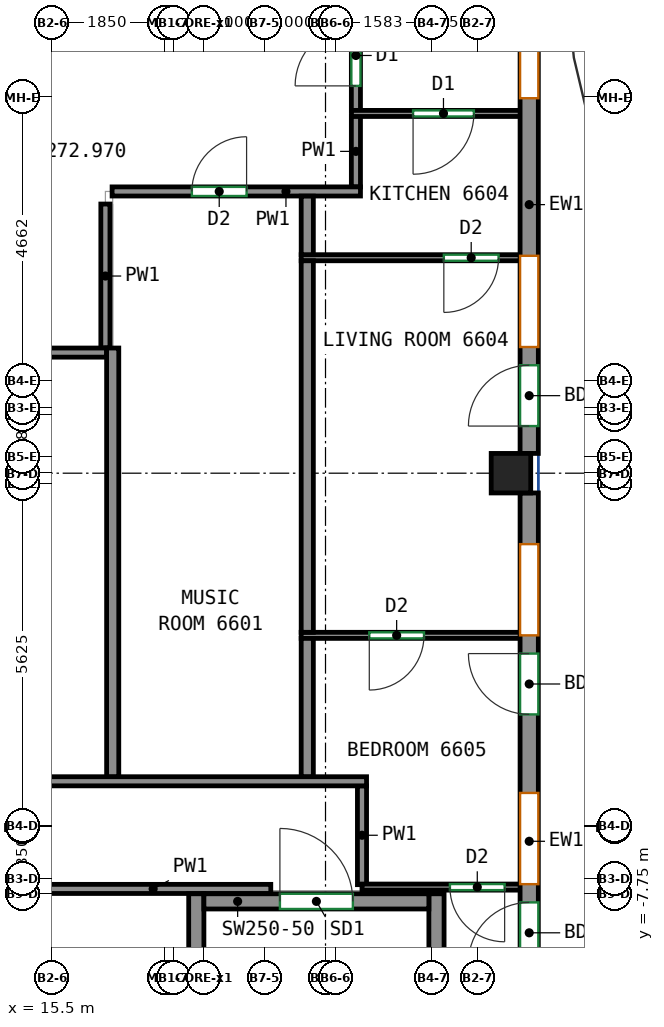
"""IFC4 building model, lengths in metres.
Left out: names, types, materials, properties, quantities, classifications, styles, units other than length and angle.
Written with IfcOpenShell. Run it as: python <this file> out.ifc"""

import sys

from ifc_helpers import new_model, si_unit, direction, frame, frame_2d, origin, origin_2d, place, context, subcontext, project, spatial, rectangle, extrude, source, transform, mapped, element, fill, save


model = new_model("IFC4")
c1 = context("Model", 3, precision=1e-05, world=origin(), true_north=direction((0.0, 1.0)))
c2 = subcontext(c1, "Body", "Model", "MODEL_VIEW")
j1 = project(units=[si_unit("LENGTHUNIT", "METRE"), si_unit("PLANEANGLEUNIT", "RADIAN")], contexts=[c1])
p1 = place(None, origin())
s1 = spatial("IfcSite", under=j1, at=p1, CompositionType="ELEMENT")
p2 = place(p1, origin())
s2 = spatial("IfcBuilding", under=s1, at=p2, CompositionType="ELEMENT")
p3 = place(p2, frame((0.0, 0.0, 270.4)))
s3 = spatial("IfcBuildingStorey", under=s2, at=p3, CompositionType="ELEMENT", Elevation=270.4)
m1 = source(origin(), c2, "Body", "SweptSolid", [
    extrude(rectangle(XDim=0.65, YDim=0.65, at=origin_2d()), origin(), (0.0, 0.0, 1.0), 3.12),
])
p4 = place(p3, frame((23.05, -0.833, 0.0), z_axis=(0.0, 0.0, 1.0), x_axis=(1.0, 0.0, 0.0)))
e1 = element("IfcColumn", 1, at=p4, inside=s3, PredefinedType="COLUMN", context=c2, shape_type="MappedRepresentation", body=[
    mapped(m1, transform((0.0, 0.0, 0.0))),
])
m2 = source(origin(), c2, "Body", "SweptSolid", [
    extrude(rectangle(XDim=8.0, YDim=0.25, at=frame_2d((4.0, 0.0))), origin(), (0.0, 0.0, 1.0), 3.12),
])
for number, where, z_axis, x_axis in (
    (2, (17.875, -15.75, 0.0), (0.0, 0.0, 1.0), (0.0, 1.0, 0.0)),
    (3, (21.825, -15.75, 0.0), (0.0, 0.0, 1.0), (0.0, 1.0, 0.0)),
):
    element("IfcWall", number, at=place(p3, frame(where, z_axis=z_axis, x_axis=x_axis)), inside=s3, PredefinedType="SHEAR", context=c2, shape_type="MappedRepresentation", body=[
        mapped(m2, transform((0.0, 0.0, 0.0))),
    ])
m3 = source(origin(), c2, "Body", "SweptSolid", [
    extrude(rectangle(XDim=3.7, YDim=0.25, at=frame_2d((1.85, 0.0))), origin(), (0.0, 0.0, 1.0), 3.12),
])
p5 = place(p3, frame((18.0, -7.875, 0.0), z_axis=(0.0, 0.0, 1.0), x_axis=(1.0, 0.0, 0.0)))
e4 = element("IfcWall", 4, at=p5, inside=s3, PredefinedType="SHEAR", context=c2, shape_type="MappedRepresentation", body=[
    mapped(m3, transform((0.0, 0.0, 0.0))),
])
p6 = place(p5, frame((1.25, 0.0, 0.0)))
e5 = element("IfcOpeningElement", 5, at=p6, cuts=e4, PredefinedType="OPENING", context=c2, shape_type="SweptSolid", body=[
    extrude(rectangle(XDim=1.2, YDim=2.1, at=frame_2d((0.6, 1.05))), frame((0.0, 0.135, 0.0), z_axis=(0.0, -1.0, 0.0), x_axis=(1.0, 0.0, 0.0)), (0.0, 0.0, 1.0), 0.27),
])
m4 = source(origin(), c2, "Body", "SweptSolid", [
    extrude(rectangle(XDim=8.184, YDim=0.3, at=frame_2d((4.092, 0.0))), origin(), (0.0, 0.0, 1.0), 3.12),
])
p7 = place(p3, frame((23.35, -9.342, 0.0), z_axis=(0.0, 0.0, 1.0), x_axis=(0.0, 1.0, 0.0)))
e6 = element("IfcWall", 6, at=p7, inside=s3, PredefinedType="SOLIDWALL", context=c2, shape_type="MappedRepresentation", body=[
    mapped(m4, transform((0.0, 0.0, 0.0))),
])
p8 = place(p7, frame((1.75, 0.0, 0.8)))
e7 = element("IfcOpeningElement", 7, at=p8, cuts=e6, PredefinedType="OPENING", context=c2, shape_type="SweptSolid", body=[
    extrude(rectangle(XDim=1.5, YDim=2.05, at=frame_2d((0.75, 1.025))), frame((0.0, 0.16, 0.0), z_axis=(0.0, -1.0, 0.0), x_axis=(1.0, 0.0, 0.0)), (0.0, 0.0, 1.0), 0.32),
])
p9 = place(p7, frame((0.45, 0.0, 0.0)))
e8 = element("IfcOpeningElement", 8, at=p9, cuts=e6, PredefinedType="OPENING", context=c2, shape_type="SweptSolid", body=[
    extrude(rectangle(XDim=1.0, YDim=2.1, at=frame_2d((0.5, 1.05))), frame((0.0, 0.16, 0.0), z_axis=(0.0, -1.0, 0.0), x_axis=(1.0, 0.0, 0.0)), (0.0, 0.0, 1.0), 0.32),
])
p10 = place(p7, frame((5.842, 0.0, 0.8)))
e9 = element("IfcOpeningElement", 9, at=p10, cuts=e6, PredefinedType="OPENING", context=c2, shape_type="SweptSolid", body=[
    extrude(rectangle(XDim=1.5, YDim=2.05, at=frame_2d((0.75, 1.025))), frame((0.0, 0.16, 0.0), z_axis=(0.0, -1.0, 0.0), x_axis=(1.0, 0.0, 0.0)), (0.0, 0.0, 1.0), 0.32),
])
p11 = place(p7, frame((4.542, 0.0, 0.0)))
e10 = element("IfcOpeningElement", 10, at=p11, cuts=e6, PredefinedType="OPENING", context=c2, shape_type="SweptSolid", body=[
    extrude(rectangle(XDim=1.0, YDim=2.1, at=frame_2d((0.5, 1.05))), frame((0.0, 0.16, 0.0), z_axis=(0.0, -1.0, 0.0), x_axis=(1.0, 0.0, 0.0)), (0.0, 0.0, 1.0), 0.32),
])
m5 = source(origin(), c2, "Body", "SweptSolid", [
    extrude(rectangle(XDim=8.183, YDim=0.3, at=frame_2d((4.092, 0.0))), origin(), (0.0, 0.0, 1.0), 3.12),
])
p12 = place(p3, frame((23.35, -0.508, 0.0), z_axis=(0.0, 0.0, 1.0), x_axis=(0.0, 1.0, 0.0)))
e11 = element("IfcWall", 11, at=p12, inside=s3, PredefinedType="SOLIDWALL", context=c2, shape_type="MappedRepresentation", body=[
    mapped(m5, transform((0.0, 0.0, 0.0))),
])
p13 = place(p12, frame((1.75, 0.0, 0.8)))
e12 = element("IfcOpeningElement", 12, at=p13, cuts=e11, PredefinedType="OPENING", context=c2, shape_type="SweptSolid", body=[
    extrude(rectangle(XDim=1.5, YDim=2.05, at=frame_2d((0.75, 1.025))), frame((0.0, 0.16, 0.0), z_axis=(0.0, -1.0, 0.0), x_axis=(1.0, 0.0, 0.0)), (0.0, 0.0, 1.0), 0.32),
])
p14 = place(p12, frame((0.45, 0.0, 0.0)))
e13 = element("IfcOpeningElement", 13, at=p14, cuts=e11, PredefinedType="OPENING", context=c2, shape_type="SweptSolid", body=[
    extrude(rectangle(XDim=1.0, YDim=2.1, at=frame_2d((0.5, 1.05))), frame((0.0, 0.16, 0.0), z_axis=(0.0, -1.0, 0.0), x_axis=(1.0, 0.0, 0.0)), (0.0, 0.0, 1.0), 0.32),
])
p15 = place(p12, frame((5.842, 0.0, 0.8)))
e14 = element("IfcOpeningElement", 14, at=p15, cuts=e11, PredefinedType="OPENING", context=c2, shape_type="SweptSolid", body=[
    extrude(rectangle(XDim=1.5, YDim=2.05, at=frame_2d((0.75, 1.025))), frame((0.0, 0.16, 0.0), z_axis=(0.0, -1.0, 0.0), x_axis=(1.0, 0.0, 0.0)), (0.0, 0.0, 1.0), 0.32),
])
p16 = place(p3, frame((15.23, -7.67, 0.0), z_axis=(0.0, 0.0, 1.0), x_axis=(1.0, 0.0, 0.0)))
e15 = element("IfcWall", 15, at=p16, inside=s3, PredefinedType="PARTITIONING", context=c2, shape_type="SweptSolid", body=[
    extrude(rectangle(XDim=3.87, YDim=0.15, at=frame_2d((1.935, 0.0))), origin(), (0.0, 0.0, 1.0), 3.12),
])
p17 = place(p3, frame((20.6, -7.6, 0.0), z_axis=(0.0, 0.0, 1.0), x_axis=(0.0, 1.0, 0.0)))
e16 = element("IfcWall", 16, at=p17, inside=s3, PredefinedType="PARTITIONING", context=c2, shape_type="SweptSolid", body=[
    extrude(rectangle(XDim=1.625, YDim=0.15, at=frame_2d((0.812, 0.0))), origin(), (0.0, 0.0, 1.0), 3.12),
])
p18 = place(p3, frame((20.5, 3.875, 0.0), z_axis=(0.0, 0.0, 1.0), x_axis=(0.0, 1.0, 0.0)))
e17 = element("IfcWall", 17, at=p18, inside=s3, PredefinedType="PARTITIONING", context=c2, shape_type="SweptSolid", body=[
    extrude(rectangle(XDim=1.168, YDim=0.15, at=frame_2d((0.584, 0.0))), origin(), (0.0, 0.0, 1.0), 3.12),
])
p19 = place(p3, frame((20.5, 5.123, 0.0), z_axis=(0.0, 0.0, 1.0), x_axis=(0.0, 1.0, 0.0)))
e18 = element("IfcWall", 18, at=p19, inside=s3, PredefinedType="PARTITIONING", context=c2, shape_type="SweptSolid", body=[
    extrude(rectangle(XDim=2.787, YDim=0.15, at=frame_2d((1.394, 0.0))), origin(), (0.0, 0.0, 1.0), 3.12),
])
p20 = place(p19, frame((0.413, 0.0, 0.0)))
e19 = element("IfcOpeningElement", 19, at=p20, cuts=e18, PredefinedType="OPENING", context=c2, shape_type="SweptSolid", body=[
    extrude(rectangle(XDim=1.0, YDim=2.1, at=frame_2d((0.5, 1.05))), frame((0.0, 0.085, 0.0), z_axis=(0.0, -1.0, 0.0), x_axis=(1.0, 0.0, 0.0)), (0.0, 0.0, 1.0), 0.17),
])
p21 = place(p3, frame((16.38, 1.225, 0.0), z_axis=(0.0, 0.0, 1.0), x_axis=(0.0, 1.0, 0.0)))
e20 = element("IfcWall", 20, at=p21, inside=s3, PredefinedType="PARTITIONING", context=c2, shape_type="SweptSolid", body=[
    extrude(rectangle(XDim=2.368, YDim=0.15, at=frame_2d((1.184, 0.0))), origin(), (0.0, 0.0, 1.0), 3.12),
])
p22 = place(p3, frame((8.305, 1.15, 0.0), z_axis=(0.0, 0.0, 1.0), x_axis=(1.0, 0.0, 0.0)))
e21 = element("IfcWall", 21, at=p22, inside=s3, PredefinedType="PARTITIONING", context=c2, shape_type="SweptSolid", body=[
    extrude(rectangle(XDim=8.095, YDim=0.15, at=frame_2d((4.047, 0.0))), origin(), (0.0, 0.0, 1.0), 3.12),
])
p23 = place(p3, frame((8.305, -5.9, 0.0), z_axis=(0.0, 0.0, 1.0), x_axis=(1.0, 0.0, 0.0)))
e22 = element("IfcWall", 22, at=p23, inside=s3, PredefinedType="PARTITIONING", context=c2, shape_type="SweptSolid", body=[
    extrude(rectangle(XDim=12.37, YDim=0.15, at=frame_2d((6.185, 0.0))), origin(), (0.0, 0.0, 1.0), 3.12),
])
p24 = place(p23, frame((6.004, 0.0, 0.0)))
e23 = element("IfcOpeningElement", 23, at=p24, cuts=e22, PredefinedType="OPENING", context=c2, shape_type="SweptSolid", body=[
    extrude(rectangle(XDim=0.9, YDim=2.1, at=frame_2d((0.45, 1.05))), frame((0.0, 0.085, 0.0), z_axis=(0.0, -1.0, 0.0), x_axis=(1.0, 0.0, 0.0)), (0.0, 0.0, 1.0), 0.17),
])
p25 = place(p3, frame((16.49, 3.8, 0.0), z_axis=(0.0, 0.0, 1.0), x_axis=(1.0, 0.0, 0.0)))
e24 = element("IfcWall", 24, at=p25, inside=s3, PredefinedType="PARTITIONING", context=c2, shape_type="SweptSolid", body=[
    extrude(rectangle(XDim=4.085, YDim=0.15, at=frame_2d((2.042, 0.0))), origin(), (0.0, 0.0, 1.0), 3.12),
])
p26 = place(p25, frame((1.312, 0.0, 0.0)))
e25 = element("IfcOpeningElement", 25, at=p26, cuts=e24, PredefinedType="OPENING", context=c2, shape_type="SweptSolid", body=[
    extrude(rectangle(XDim=0.9, YDim=2.1, at=frame_2d((0.45, 1.05))), frame((0.0, 0.085, 0.0), z_axis=(0.0, -1.0, 0.0), x_axis=(1.0, 0.0, 0.0)), (0.0, 0.0, 1.0), 0.17),
])
p27 = place(p3, frame((23.25, -7.64, 0.0), z_axis=(0.0, 0.0, 1.0), x_axis=(-1.0, 0.0, 0.0)))
e26 = element("IfcWall", 26, at=p27, inside=s3, PredefinedType="PARTITIONING", context=c2, shape_type="SweptSolid", body=[
    extrude(rectangle(XDim=2.65, YDim=0.1, at=frame_2d((1.325, 0.0))), origin(), (0.0, 0.0, 1.0), 3.12),
])
p28 = place(p27, frame((0.304, 0.0, 0.0)))
e27 = element("IfcOpeningElement", 27, at=p28, cuts=e26, PredefinedType="OPENING", context=c2, shape_type="SweptSolid", body=[
    extrude(rectangle(XDim=0.9, YDim=2.1, at=frame_2d((0.45, 1.05))), frame((0.0, 0.06, 0.0), z_axis=(0.0, -1.0, 0.0), x_axis=(1.0, 0.0, 0.0)), (0.0, 0.0, 1.0), 0.12),
])
p29 = place(p3, frame((23.25, -3.5, 0.0), z_axis=(0.0, 0.0, 1.0), x_axis=(-1.0, 0.0, 0.0)))
e28 = element("IfcWall", 28, at=p29, inside=s3, PredefinedType="PARTITIONING", context=c2, shape_type="SweptSolid", body=[
    extrude(rectangle(XDim=3.65, YDim=0.1, at=frame_2d((1.825, 0.0))), origin(), (0.0, 0.0, 1.0), 3.12),
])
p30 = place(p29, frame((1.63, 0.0, 0.0)))
e29 = element("IfcOpeningElement", 29, at=p30, cuts=e28, PredefinedType="OPENING", context=c2, shape_type="SweptSolid", body=[
    extrude(rectangle(XDim=0.9, YDim=2.1, at=frame_2d((0.45, 1.05))), frame((0.0, 0.06, 0.0), z_axis=(0.0, -1.0, 0.0), x_axis=(1.0, 0.0, 0.0)), (0.0, 0.0, 1.0), 0.12),
])
p31 = place(p3, frame((19.7, -5.823, 0.0), z_axis=(0.0, 0.0, 1.0), x_axis=(0.0, 1.0, 0.0)))
e30 = element("IfcWall", 30, at=p31, inside=s3, PredefinedType="PARTITIONING", context=c2, shape_type="SweptSolid", body=[
    extrude(rectangle(XDim=2.273, YDim=0.2, at=frame_2d((1.136, 0.0))), origin(), (0.0, 0.0, 1.0), 3.12),
])
p32 = place(p3, frame((23.25, 2.71, 0.0), z_axis=(0.0, 0.0, 1.0), x_axis=(-1.0, 0.0, 0.0)))
e31 = element("IfcWall", 31, at=p32, inside=s3, PredefinedType="PARTITIONING", context=c2, shape_type="SweptSolid", body=[
    extrude(rectangle(XDim=3.65, YDim=0.1, at=frame_2d((1.825, 0.0))), origin(), (0.0, 0.0, 1.0), 3.12),
])
p33 = place(p32, frame((0.404, 0.0, 0.0)))
e32 = element("IfcOpeningElement", 32, at=p33, cuts=e31, PredefinedType="OPENING", context=c2, shape_type="SweptSolid", body=[
    extrude(rectangle(XDim=0.9, YDim=2.1, at=frame_2d((0.45, 1.05))), frame((0.0, 0.06, 0.0), z_axis=(0.0, -1.0, 0.0), x_axis=(1.0, 0.0, 0.0)), (0.0, 0.0, 1.0), 0.12),
])
p34 = place(p3, frame((19.7, -3.45, 0.0), z_axis=(0.0, 0.0, 1.0), x_axis=(0.0, 1.0, 0.0)))
e33 = element("IfcWall", 33, at=p34, inside=s3, PredefinedType="PARTITIONING", context=c2, shape_type="SweptSolid", body=[
    extrude(rectangle(XDim=6.11, YDim=0.2, at=frame_2d((3.055, 0.0))), origin(), (0.0, 0.0, 1.0), 3.12),
])
p35 = place(p3, frame((23.25, 5.083, 0.0), z_axis=(0.0, 0.0, 1.0), x_axis=(-1.0, 0.0, 0.0)))
e34 = element("IfcWall", 34, at=p35, inside=s3, PredefinedType="PARTITIONING", context=c2, shape_type="SweptSolid", body=[
    extrude(rectangle(XDim=2.823, YDim=0.1, at=frame_2d((1.412, 0.0))), origin(), (0.0, 0.0, 1.0), 3.12),
])
p36 = place(p35, frame((0.81, 0.0, 0.0)))
e35 = element("IfcOpeningElement", 35, at=p36, cuts=e34, PredefinedType="OPENING", context=c2, shape_type="SweptSolid", body=[
    extrude(rectangle(XDim=1.0, YDim=2.1, at=frame_2d((0.5, 1.05))), frame((0.0, 0.06, 0.0), z_axis=(0.0, -1.0, 0.0), x_axis=(1.0, 0.0, 0.0)), (0.0, 0.0, 1.0), 0.12),
])
p37 = place(p3, frame((19.7, 2.76, 0.0), z_axis=(0.0, 0.0, 1.0), x_axis=(0.0, 1.0, 0.0)))
e36 = element("IfcWall", 36, at=p37, inside=s3, PredefinedType="PARTITIONING", context=c2, shape_type="SweptSolid", body=[
    extrude(rectangle(XDim=0.963, YDim=0.2, at=frame_2d((0.481, 0.0))), origin(), (0.0, 0.0, 1.0), 3.12),
])
p38 = place(p3, frame((16.5, -5.823, 0.0), z_axis=(0.0, 0.0, 1.0), x_axis=(0.0, 1.0, 0.0)))
e37 = element("IfcWall", 37, at=p38, inside=s3, PredefinedType="PARTITIONING", context=c2, shape_type="SweptSolid", body=[
    extrude(rectangle(XDim=7.048, YDim=0.2, at=frame_2d((3.524, 0.0))), origin(), (0.0, 0.0, 1.0), 3.12),
])
p39 = place(p8, origin())
e38 = element("IfcWindow", 38, at=p39, inside=s3, PartitioningType="SINGLE_PANEL", PredefinedType="WINDOW", context=c2, shape_type="SweptSolid", body=[
    extrude(rectangle(XDim=1.5, YDim=2.05, at=frame_2d((0.75, 1.025))), frame((0.0, 0.03, 0.0), z_axis=(0.0, -1.0, 0.0), x_axis=(1.0, 0.0, 0.0)), (0.0, 0.0, 1.0), 0.06),
])
fill(e7, e38)
p40 = place(p9, origin())
e39 = element("IfcDoor", 39, at=p40, inside=s3, OperationType="SINGLE_SWING_LEFT", PredefinedType="DOOR", context=c2, shape_type="SweptSolid", body=[
    extrude(rectangle(XDim=1.0, YDim=2.1, at=frame_2d((0.5, 1.05))), frame((0.0, 0.025, 0.0), z_axis=(0.0, -1.0, 0.0), x_axis=(1.0, 0.0, 0.0)), (0.0, 0.0, 1.0), 0.05),
])
fill(e8, e39)
p41 = place(p10, origin())
e40 = element("IfcWindow", 40, at=p41, inside=s3, PartitioningType="SINGLE_PANEL", PredefinedType="WINDOW", context=c2, shape_type="SweptSolid", body=[
    extrude(rectangle(XDim=1.5, YDim=2.05, at=frame_2d((0.75, 1.025))), frame((0.0, 0.03, 0.0), z_axis=(0.0, -1.0, 0.0), x_axis=(1.0, 0.0, 0.0)), (0.0, 0.0, 1.0), 0.06),
])
fill(e9, e40)
p42 = place(p11, origin())
e41 = element("IfcDoor", 41, at=p42, inside=s3, OperationType="SINGLE_SWING_RIGHT", PredefinedType="DOOR", context=c2, shape_type="SweptSolid", body=[
    extrude(rectangle(XDim=1.0, YDim=2.1, at=frame_2d((0.5, 1.05))), frame((0.0, 0.025, 0.0), z_axis=(0.0, -1.0, 0.0), x_axis=(1.0, 0.0, 0.0)), (0.0, 0.0, 1.0), 0.05),
])
fill(e10, e41)
p43 = place(p13, origin())
e42 = element("IfcWindow", 42, at=p43, inside=s3, PartitioningType="SINGLE_PANEL", PredefinedType="WINDOW", context=c2, shape_type="SweptSolid", body=[
    extrude(rectangle(XDim=1.5, YDim=2.05, at=frame_2d((0.75, 1.025))), frame((0.0, 0.03, 0.0), z_axis=(0.0, -1.0, 0.0), x_axis=(1.0, 0.0, 0.0)), (0.0, 0.0, 1.0), 0.06),
])
fill(e12, e42)
p44 = place(p14, origin())
e43 = element("IfcDoor", 43, at=p44, inside=s3, OperationType="SINGLE_SWING_LEFT", PredefinedType="DOOR", context=c2, shape_type="SweptSolid", body=[
    extrude(rectangle(XDim=1.0, YDim=2.1, at=frame_2d((0.5, 1.05))), frame((0.0, 0.025, 0.0), z_axis=(0.0, -1.0, 0.0), x_axis=(1.0, 0.0, 0.0)), (0.0, 0.0, 1.0), 0.05),
])
fill(e13, e43)
p45 = place(p15, origin())
e44 = element("IfcWindow", 44, at=p45, inside=s3, PartitioningType="SINGLE_PANEL", PredefinedType="WINDOW", context=c2, shape_type="SweptSolid", body=[
    extrude(rectangle(XDim=1.5, YDim=2.05, at=frame_2d((0.75, 1.025))), frame((0.0, 0.03, 0.0), z_axis=(0.0, -1.0, 0.0), x_axis=(1.0, 0.0, 0.0)), (0.0, 0.0, 1.0), 0.06),
])
fill(e14, e44)
p46 = place(p6, origin())
e45 = element("IfcDoor", 45, at=p46, inside=s3, OperationType="DOUBLE_DOOR_SINGLE_SWING", PredefinedType="DOOR", context=c2, shape_type="SweptSolid", body=[
    extrude(rectangle(XDim=1.2, YDim=2.1, at=frame_2d((0.6, 1.05))), frame((0.0, 0.025, 0.0), z_axis=(0.0, -1.0, 0.0), x_axis=(1.0, 0.0, 0.0)), (0.0, 0.0, 1.0), 0.05),
])
fill(e5, e45)
p47 = place(p28, origin())
e46 = element("IfcDoor", 46, at=p47, inside=s3, OperationType="SINGLE_SWING_LEFT", PredefinedType="DOOR", context=c2, shape_type="SweptSolid", body=[
    extrude(rectangle(XDim=0.9, YDim=2.1, at=frame_2d((0.45, 1.05))), frame((0.0, 0.025, 0.0), z_axis=(0.0, -1.0, 0.0), x_axis=(1.0, 0.0, 0.0)), (0.0, 0.0, 1.0), 0.05),
])
fill(e27, e46)
p48 = place(p30, origin())
e47 = element("IfcDoor", 47, at=p48, inside=s3, OperationType="SINGLE_SWING_RIGHT", PredefinedType="DOOR", context=c2, shape_type="SweptSolid", body=[
    extrude(rectangle(XDim=0.9, YDim=2.1, at=frame_2d((0.45, 1.05))), frame((0.0, 0.025, 0.0), z_axis=(0.0, -1.0, 0.0), x_axis=(1.0, 0.0, 0.0)), (0.0, 0.0, 1.0), 0.05),
])
fill(e29, e47)
p49 = place(p33, origin())
e48 = element("IfcDoor", 48, at=p49, inside=s3, OperationType="SINGLE_SWING_RIGHT", PredefinedType="DOOR", context=c2, shape_type="SweptSolid", body=[
    extrude(rectangle(XDim=0.9, YDim=2.1, at=frame_2d((0.45, 1.05))), frame((0.0, 0.025, 0.0), z_axis=(0.0, -1.0, 0.0), x_axis=(1.0, 0.0, 0.0)), (0.0, 0.0, 1.0), 0.05),
])
fill(e32, e48)
p50 = place(p26, origin())
e49 = element("IfcDoor", 49, at=p50, inside=s3, OperationType="SINGLE_SWING_RIGHT", PredefinedType="DOOR", context=c2, shape_type="SweptSolid", body=[
    extrude(rectangle(XDim=0.9, YDim=2.1, at=frame_2d((0.45, 1.05))), frame((0.0, 0.025, 0.0), z_axis=(0.0, -1.0, 0.0), x_axis=(1.0, 0.0, 0.0)), (0.0, 0.0, 1.0), 0.05),
])
fill(e25, e49)
p51 = place(p36, origin())
e50 = element("IfcDoor", 50, at=p51, inside=s3, OperationType="SINGLE_SWING_RIGHT", PredefinedType="DOOR", context=c2, shape_type="SweptSolid", body=[
    extrude(rectangle(XDim=1.0, YDim=2.1, at=frame_2d((0.5, 1.05))), frame((0.0, 0.025, 0.0), z_axis=(0.0, -1.0, 0.0), x_axis=(1.0, 0.0, 0.0)), (0.0, 0.0, 1.0), 0.05),
])
fill(e35, e50)
p52 = place(p20, origin())
e51 = element("IfcDoor", 51, at=p52, inside=s3, OperationType="SINGLE_SWING_LEFT", PredefinedType="DOOR", context=c2, shape_type="SweptSolid", body=[
    extrude(rectangle(XDim=1.0, YDim=2.1, at=frame_2d((0.5, 1.05))), frame((0.0, 0.025, 0.0), z_axis=(0.0, -1.0, 0.0), x_axis=(1.0, 0.0, 0.0)), (0.0, 0.0, 1.0), 0.05),
])
fill(e19, e51)
save(model, sys.argv[1])
